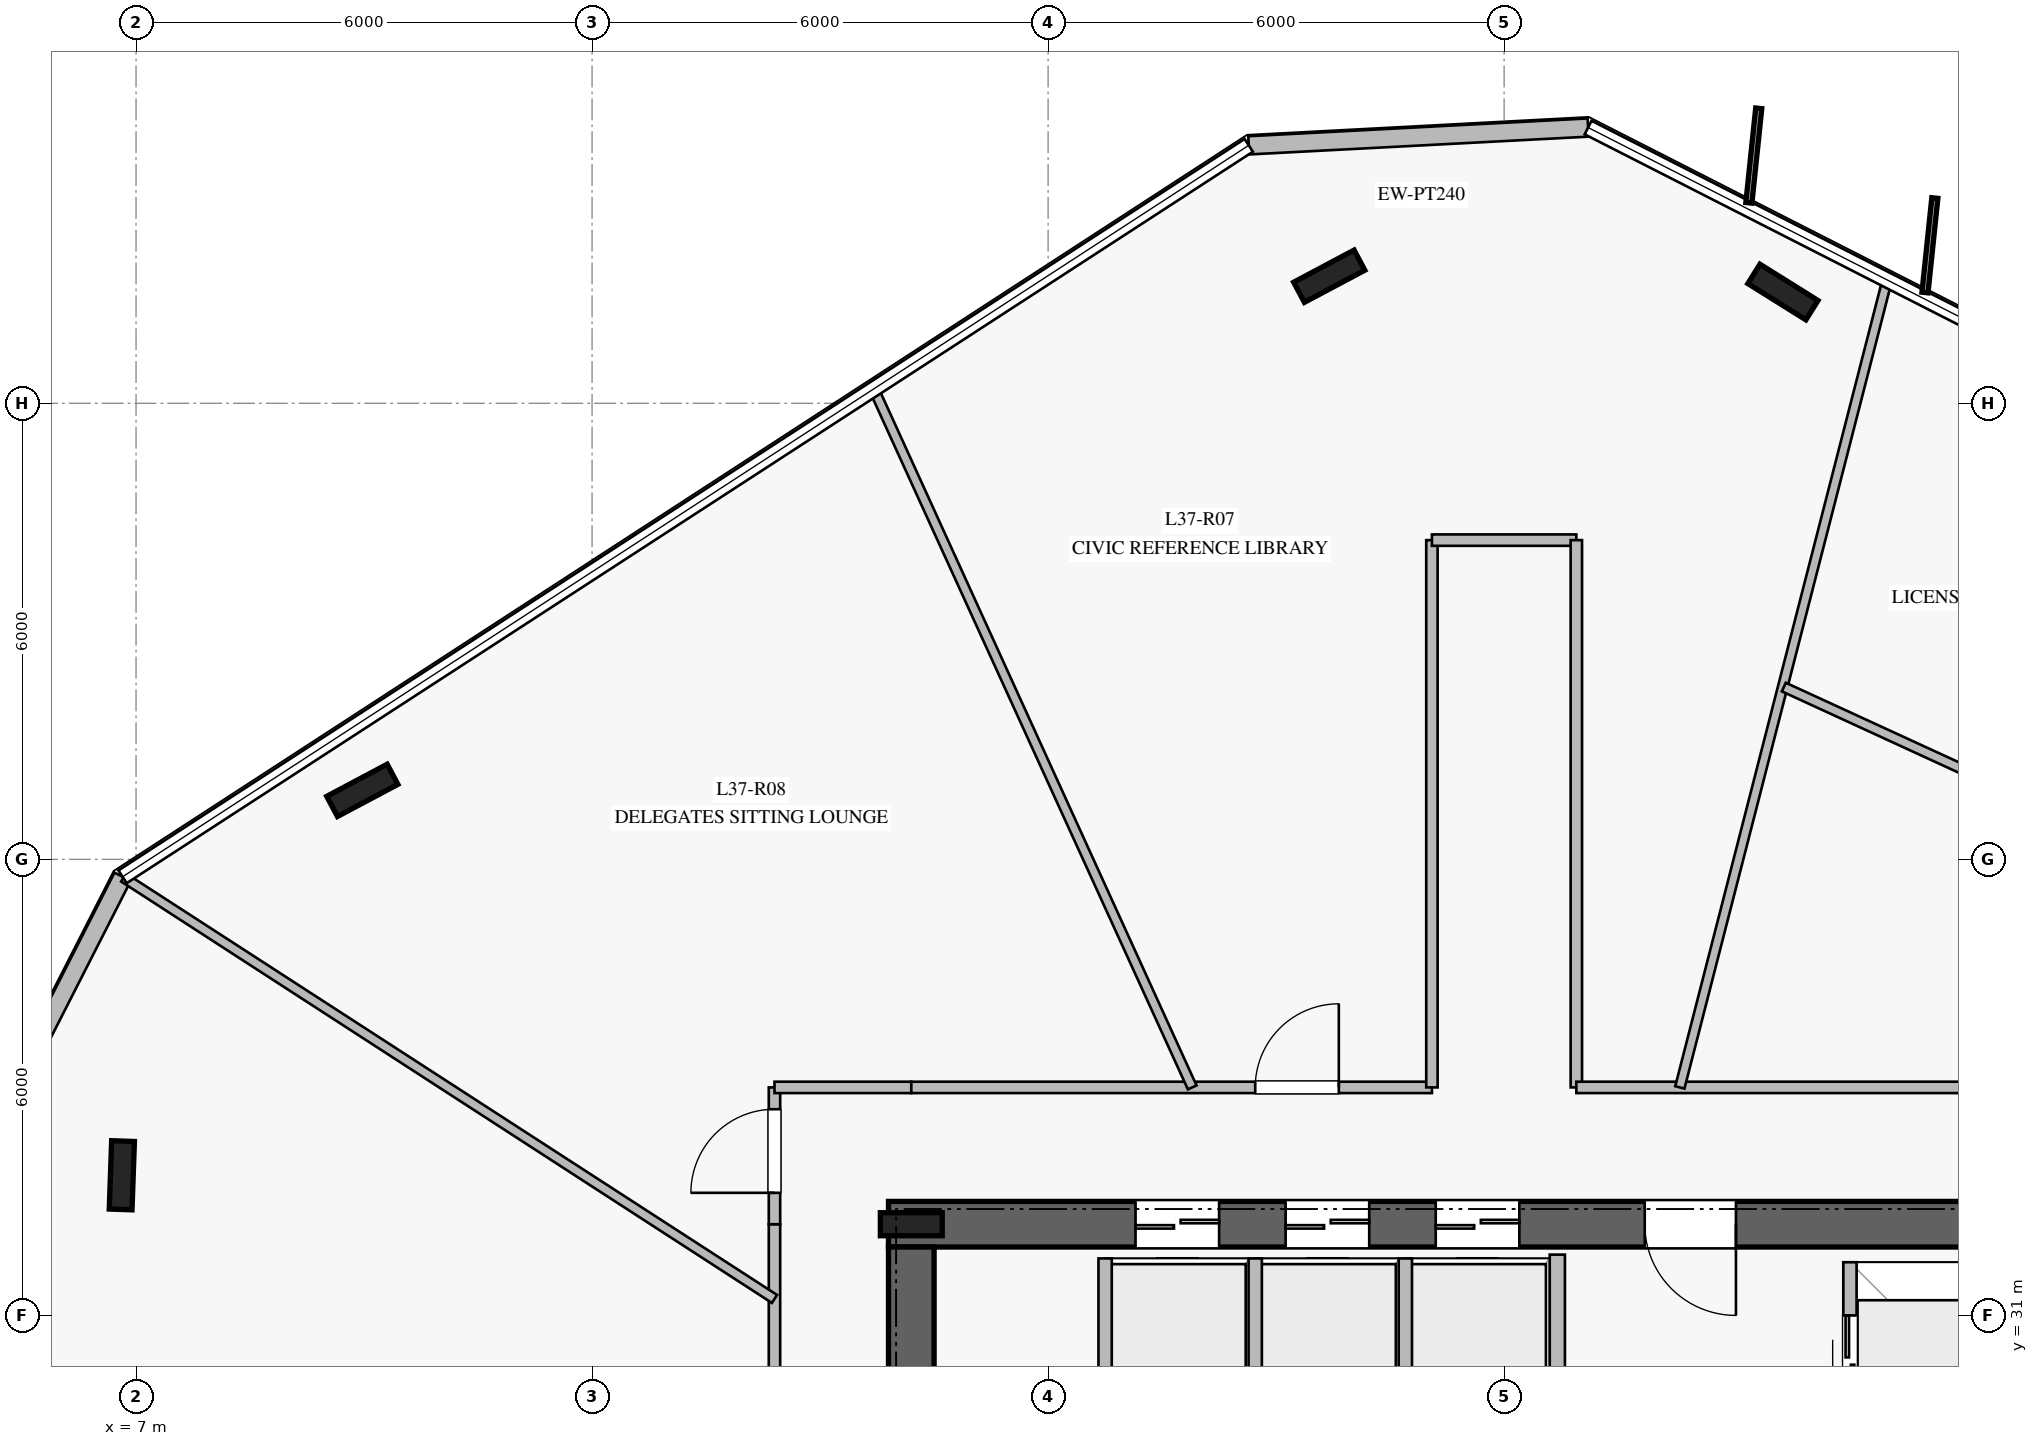
"""IFC4 building model, lengths in metres.
Left out: names, types, materials, properties, quantities, classifications, styles, units other than length and angle.
Written with IfcOpenShell. Run it as: python <this file> out.ifc"""

import sys

from ifc_helpers import new_model, si_unit, direction, frame, frame_2d, origin, origin_2d, place, context, subcontext, project, spatial, rectangle, i_section, extrude, element, fill, save


model = new_model("IFC4")
c1 = context("Model", 3, precision=1e-05, world=origin(), true_north=direction((0.0, 1.0)))
c2 = subcontext(c1, "Body", "Model", "MODEL_VIEW")
j1 = project(units=[si_unit("LENGTHUNIT", "METRE"), si_unit("PLANEANGLEUNIT", "RADIAN")], contexts=[c1])
p1 = place(None, origin())
s1 = spatial("IfcSite", under=j1, at=p1, CompositionType="ELEMENT")
p2 = place(p1, origin())
s2 = spatial("IfcBuilding", under=s1, at=p2, CompositionType="ELEMENT")
p3 = place(p2, frame((0.0, 0.0, 154.4)))
s3 = spatial("IfcBuildingStorey", under=s2, at=p3, CompositionType="ELEMENT", Elevation=154.4)
p4 = place(p3, frame((33.1, 32.2, 0.0), z_axis=(0.0, 0.0, 1.0), x_axis=(-1.0, 0.0, 0.0)))
e1 = element("IfcWall", 1, at=p4, inside=s3, PredefinedType="SHEAR", context=c2, shape_type="SweptSolid", body=[
    extrude(rectangle(XDim=16.2, YDim=0.6, at=frame_2d((8.1, 0.0))), origin(), (0.0, 0.0, 1.0), 3.76),
])
p5 = place(p4, frame((5.05, 0.0, 0.0)))
e2 = element("IfcOpeningElement", 2, at=p5, cuts=e1, PredefinedType="OPENING", context=c2, shape_type="SweptSolid", body=[
    extrude(rectangle(XDim=1.2, YDim=2.25, at=frame_2d((0.6, 1.125))), frame((0.0, 0.31, 0.0), z_axis=(0.0, -1.0, 0.0), x_axis=(1.0, 0.0, 0.0)), (0.0, 0.0, 1.0), 0.62),
])
p6 = place(p4, frame((11.85, 0.0, 0.0)))
e3 = element("IfcOpeningElement", 3, at=p6, cuts=e1, PredefinedType="OPENING", context=c2, shape_type="SweptSolid", body=[
    extrude(rectangle(XDim=1.1, YDim=2.2, at=frame_2d((0.55, 1.1))), frame((0.0, 0.31, 0.0), z_axis=(0.0, -1.0, 0.0), x_axis=(1.0, 0.0, 0.0)), (0.0, 0.0, 1.0), 0.62),
])
p7 = place(p4, frame((9.875, 0.0, 0.0)))
e4 = element("IfcOpeningElement", 4, at=p7, cuts=e1, PredefinedType="OPENING", context=c2, shape_type="SweptSolid", body=[
    extrude(rectangle(XDim=1.1, YDim=2.2, at=frame_2d((0.55, 1.1))), frame((0.0, 0.31, 0.0), z_axis=(0.0, -1.0, 0.0), x_axis=(1.0, 0.0, 0.0)), (0.0, 0.0, 1.0), 0.62),
])
p8 = place(p4, frame((7.9, 0.0, 0.0)))
e5 = element("IfcOpeningElement", 5, at=p8, cuts=e1, PredefinedType="OPENING", context=c2, shape_type="SweptSolid", body=[
    extrude(rectangle(XDim=1.1, YDim=2.2, at=frame_2d((0.55, 1.1))), frame((0.0, 0.31, 0.0), z_axis=(0.0, -1.0, 0.0), x_axis=(1.0, 0.0, 0.0)), (0.0, 0.0, 1.0), 0.62),
])
p9 = place(p3, frame((17.2, 31.9, 0.0), z_axis=(0.0, 0.0, 1.0), x_axis=(0.0, -1.0, 0.0)))
e6 = element("IfcWall", 6, at=p9, inside=s3, PredefinedType="SHEAR", context=c2, shape_type="SweptSolid", body=[
    extrude(rectangle(XDim=13.8, YDim=0.6, at=frame_2d((6.9, 0.0))), origin(), (0.0, 0.0, 1.0), 3.76),
])
p10 = place(p9, frame((2.05, 0.0, 0.0)))
e7 = element("IfcOpeningElement", 7, at=p10, cuts=e6, PredefinedType="OPENING", context=c2, shape_type="SweptSolid", body=[
    extrude(rectangle(XDim=1.5, YDim=2.2, at=frame_2d((0.75, 1.1))), frame((0.0, 0.31, 0.0), z_axis=(0.0, -1.0, 0.0), x_axis=(1.0, 0.0, 0.0)), (0.0, 0.0, 1.0), 0.62),
])
p11 = place(p3, frame((17.2, 32.2, 0.0), z_axis=(0.0, 0.0, 1.0), x_axis=(1.0, 0.0, 0.0)))
e8 = element("IfcColumn", 8, at=p11, inside=s3, PredefinedType="COLUMN", context=c2, shape_type="SweptSolid", body=[
    extrude(i_section(OverallWidth=0.303, OverallDepth=0.814, WebThickness=0.021, FlangeThickness=0.04, at=origin_2d()), origin(), (0.0, 0.0, 1.0), 4.0),
])
for number, where, z_axis, x_axis in (
    (9, (28.668, 44.464, 0.0), (0.0, 0.0, 1.0), (-0.848, 0.53, 0.0)),
    (10, (22.699, 44.672, 0.0), (0.0, 0.0, 1.0), (0.883, 0.469, 0.0)),
    (11, (9.977, 37.908, 0.0), (0.0, 0.0, 1.0), (0.883, 0.469, 0.0)),
    (12, (6.813, 32.844, 0.0), (0.0, 0.0, 1.0), (0.035, 0.999, 0.0)),
):
    element("IfcColumn", number, at=place(p3, frame(where, z_axis=z_axis, x_axis=x_axis)), inside=s3, PredefinedType="COLUMN", context=c2, shape_type="SweptSolid", body=[
        extrude(i_section(OverallWidth=0.3, OverallDepth=0.9, WebThickness=0.019, FlangeThickness=0.035, at=origin_2d()), origin(), (0.0, 0.0, 1.0), 4.0),
    ])
p12 = place(p3, frame((26.105, 46.628, 0.0), z_axis=(0.0, 0.0, 1.0), x_axis=(-0.998630920983, -0.052309498732, 0.0)))
e13 = element("IfcWall", 13, at=p12, inside=s3, PredefinedType="STANDARD", context=c2, shape_type="SweptSolid", body=[
    extrude(rectangle(XDim=4.471, YDim=0.24, at=frame_2d((2.236, 0.0))), origin(), (0.0, 0.0, 1.0), 3.76),
])
p13 = place(p3, frame((6.823, 36.771, 0.0), z_axis=(0.0, 0.0, 1.0), x_axis=(-0.454103301767, -0.89094903969, 0.0)))
e14 = element("IfcWall", 14, at=p13, inside=s3, PredefinedType="STANDARD", context=c2, shape_type="SweptSolid", body=[
    extrude(rectangle(XDim=4.47, YDim=0.24, at=frame_2d((2.235, 0.0))), origin(), (0.0, 0.0, 1.0), 3.76),
])
p14 = place(p3, frame((25.7, 26.65, 0.0), z_axis=(0.0, 0.0, 1.0), x_axis=(0.0, 1.0, 0.0)))
e15 = element("IfcWall", 15, at=p14, inside=s3, PredefinedType="PARTITIONING", context=c2, shape_type="SweptSolid", body=[
    extrude(rectangle(XDim=5.15, YDim=0.2, at=frame_2d((2.575, 0.0))), origin(), (0.0, 0.0, 1.0), 3.76),
])
for number, where, z_axis, x_axis in (
    (16, (19.75, 29.4, 0.0), (0.0, 0.0, 1.0), (0.0, 1.0, 0.0)),
    (17, (21.725, 29.4, 0.0), (0.0, 0.0, 1.0), (0.0, 1.0, 0.0)),
    (18, (23.7, 29.4, 0.0), (0.0, 0.0, 1.0), (0.0, 1.0, 0.0)),
):
    element("IfcWall", number, at=place(p3, frame(where, z_axis=z_axis, x_axis=x_axis)), inside=s3, PredefinedType="PARTITIONING", context=c2, shape_type="SweptSolid", body=[
        extrude(rectangle(XDim=2.35, YDim=0.175, at=frame_2d((1.175, 0.0))), origin(), (0.0, 0.0, 1.0), 3.76),
    ])
p15 = place(p3, frame((29.55, 29.1, 0.0), z_axis=(0.0, 0.0, 1.0), x_axis=(0.0, 1.0, 0.0)))
e19 = element("IfcWall", 19, at=p15, inside=s3, PredefinedType="PARTITIONING", context=c2, shape_type="SweptSolid", body=[
    extrude(rectangle(XDim=2.6, YDim=0.175, at=frame_2d((1.3, 0.0))), origin(), (0.0, 0.0, 1.0), 3.76),
])
p16 = place(p15, frame((0.7, 0.0, 0.0)))
e20 = element("IfcOpeningElement", 20, at=p16, cuts=e19, PredefinedType="OPENING", context=c2, shape_type="SweptSolid", body=[
    extrude(rectangle(XDim=1.2, YDim=2.2, at=frame_2d((0.6, 1.1))), frame((0.0, 0.098, 0.0), z_axis=(0.0, -1.0, 0.0), x_axis=(1.0, 0.0, 0.0)), (0.0, 0.0, 1.0), 0.195),
])
p17 = place(p3, frame((15.4, 25.95, 0.0), z_axis=(0.0, 0.0, 1.0), x_axis=(0.0, 1.0, 0.0)))
e21 = element("IfcWall", 21, at=p17, inside=s3, PredefinedType="PARTITIONING", context=c2, shape_type="SweptSolid", body=[
    extrude(rectangle(XDim=6.25, YDim=0.15, at=frame_2d((3.125, 0.0))), origin(), (0.0, 0.0, 1.0), 3.21),
])
p18 = place(p3, frame((15.4, 32.2, 0.0), z_axis=(0.0, 0.0, 1.0), x_axis=(0.0, 1.0, 0.0)))
e22 = element("IfcWall", 22, at=p18, inside=s3, PredefinedType="PARTITIONING", context=c2, shape_type="SweptSolid", body=[
    extrude(rectangle(XDim=1.8, YDim=0.15, at=frame_2d((0.9, 0.0))), origin(), (0.0, 0.0, 1.0), 3.21),
])
p19 = place(p18, frame((0.413, 0.0, 0.0)))
e23 = element("IfcOpeningElement", 23, at=p19, cuts=e22, PredefinedType="OPENING", context=c2, shape_type="SweptSolid", body=[
    extrude(rectangle(XDim=1.1, YDim=2.2, at=frame_2d((0.55, 1.1))), frame((0.0, 0.085, 0.0), z_axis=(0.0, -1.0, 0.0), x_axis=(1.0, 0.0, 0.0)), (0.0, 0.0, 1.0), 0.17),
])
p20 = place(p3, frame((15.4, 34.0, 0.0), z_axis=(0.0, 0.0, 1.0), x_axis=(1.0, 0.0, 0.0)))
e24 = element("IfcWall", 24, at=p20, inside=s3, PredefinedType="PARTITIONING", context=c2, shape_type="SweptSolid", body=[
    extrude(rectangle(XDim=1.8, YDim=0.15, at=frame_2d((0.9, 0.0))), origin(), (0.0, 0.0, 1.0), 3.76),
])
p21 = place(p3, frame((17.2, 34.0, 0.0), z_axis=(0.0, 0.0, 1.0), x_axis=(1.0, 0.0, 0.0)))
e25 = element("IfcWall", 25, at=p21, inside=s3, PredefinedType="PARTITIONING", context=c2, shape_type="SweptSolid", body=[
    extrude(rectangle(XDim=6.85, YDim=0.15, at=frame_2d((3.425, 0.0))), origin(), (0.0, 0.0, 1.0), 3.21),
])
p22 = place(p21, frame((4.525, 0.0, 0.0)))
e26 = element("IfcOpeningElement", 26, at=p22, cuts=e25, PredefinedType="OPENING", context=c2, shape_type="SweptSolid", body=[
    extrude(rectangle(XDim=1.1, YDim=2.2, at=frame_2d((0.55, 1.1))), frame((0.0, 0.085, 0.0), z_axis=(0.0, -1.0, 0.0), x_axis=(1.0, 0.0, 0.0)), (0.0, 0.0, 1.0), 0.17),
])
p23 = place(p3, frame((24.05, 34.0, 0.0), z_axis=(0.0, 0.0, 1.0), x_axis=(0.0, 1.0, 0.0)))
e27 = element("IfcWall", 27, at=p23, inside=s3, PredefinedType="PARTITIONING", context=c2, shape_type="SweptSolid", body=[
    extrude(rectangle(XDim=7.2, YDim=0.15, at=frame_2d((3.6, 0.0))), origin(), (0.0, 0.0, 1.0), 3.36),
])
p24 = place(p3, frame((24.05, 41.2, 0.0), z_axis=(0.0, 0.0, 1.0), x_axis=(1.0, 0.0, 0.0)))
e28 = element("IfcWall", 28, at=p24, inside=s3, PredefinedType="PARTITIONING", context=c2, shape_type="SweptSolid", body=[
    extrude(rectangle(XDim=1.9, YDim=0.15, at=frame_2d((0.95, 0.0))), origin(), (0.0, 0.0, 1.0), 3.76),
])
p25 = place(p3, frame((25.95, 41.2, 0.0), z_axis=(0.0, 0.0, 1.0), x_axis=(0.0, -1.0, 0.0)))
e29 = element("IfcWall", 29, at=p25, inside=s3, PredefinedType="PARTITIONING", context=c2, shape_type="SweptSolid", body=[
    extrude(rectangle(XDim=7.2, YDim=0.15, at=frame_2d((3.6, 0.0))), origin(), (0.0, 0.0, 1.0), 3.36),
])
p26 = place(p3, frame((25.95, 34.0, 0.0), z_axis=(0.0, 0.0, 1.0), x_axis=(1.0, 0.0, 0.0)))
e30 = element("IfcWall", 30, at=p26, inside=s3, PredefinedType="PARTITIONING", context=c2, shape_type="SweptSolid", body=[
    extrude(rectangle(XDim=15.25, YDim=0.15, at=frame_2d((7.625, 0.0))), origin(), (0.0, 0.0, 1.0), 3.21),
])
p27 = place(p26, frame((12.048, 0.0, 0.0)))
e31 = element("IfcOpeningElement", 31, at=p27, cuts=e30, PredefinedType="OPENING", context=c2, shape_type="SweptSolid", body=[
    extrude(rectangle(XDim=1.1, YDim=2.2, at=frame_2d((0.55, 1.1))), frame((0.0, 0.085, 0.0), z_axis=(0.0, -1.0, 0.0), x_axis=(1.0, 0.0, 0.0)), (0.0, 0.0, 1.0), 0.17),
])
p28 = place(p26, frame((5.305, 0.0, 0.0)))
e32 = element("IfcOpeningElement", 32, at=p28, cuts=e30, PredefinedType="OPENING", context=c2, shape_type="SweptSolid", body=[
    extrude(rectangle(XDim=1.1, YDim=2.2, at=frame_2d((0.55, 1.1))), frame((0.0, 0.085, 0.0), z_axis=(0.0, -1.0, 0.0), x_axis=(1.0, 0.0, 0.0)), (0.0, 0.0, 1.0), 0.17),
])
p29 = place(p3, frame((27.312, 34.0, 0.0), z_axis=(0.0, 0.0, 1.0), x_axis=(0.248752431695, 0.96856710027, 0.0)))
e33 = element("IfcWall", 33, at=p29, inside=s3, PredefinedType="PARTITIONING", context=c2, shape_type="SweptSolid", body=[
    extrude(rectangle(XDim=10.95, YDim=0.125, at=frame_2d((5.475, 0.0))), origin(), (0.0, 0.0, 1.0), 3.16),
])
p30 = place(p3, frame((20.896, 34.0, 0.0), z_axis=(0.0, 0.0, 1.0), x_axis=(-0.414877179532, 0.90987742356, 0.0)))
e34 = element("IfcWall", 34, at=p30, inside=s3, PredefinedType="PARTITIONING", context=c2, shape_type="SweptSolid", body=[
    extrude(rectangle(XDim=10.083, YDim=0.125, at=frame_2d((5.042, 0.0))), origin(), (0.0, 0.0, 1.0), 3.05),
])
p31 = place(p3, frame((15.4, 31.217, 0.0), z_axis=(0.0, 0.0, 1.0), x_axis=(-0.839399301713, 0.543515236478, 0.0)))
e35 = element("IfcWall", 35, at=p31, inside=s3, PredefinedType="PARTITIONING", context=c2, shape_type="SweptSolid", body=[
    extrude(rectangle(XDim=10.2, YDim=0.125, at=frame_2d((5.1, 0.0))), origin(), (0.0, 0.0, 1.0), 3.16),
])
p32 = place(p3, frame((37.577, 35.177, 0.0), z_axis=(0.0, 0.0, 1.0), x_axis=(-0.908588116284, 0.417693230671, 0.0)))
e36 = element("IfcWall", 36, at=p32, inside=s3, PredefinedType="PARTITIONING", context=c2, shape_type="SweptSolid", body=[
    extrude(rectangle(XDim=9.792, YDim=0.125, at=frame_2d((4.896, 0.0))), origin(), (0.0, 0.0, 1.0), 3.21),
])
p33 = place(p32, frame((4.396, 0.0, 0.0)))
e37 = element("IfcOpeningElement", 37, at=p33, cuts=e36, PredefinedType="OPENING", context=c2, shape_type="SweptSolid", body=[
    extrude(rectangle(XDim=1.0, YDim=2.15, at=frame_2d((0.5, 1.075))), frame((0.0, 0.073, 0.0), z_axis=(0.0, -1.0, 0.0), x_axis=(1.0, 0.0, 0.0)), (0.0, 0.0, 1.0), 0.145),
])
p34 = place(p5, origin())
e38 = element("IfcDoor", 38, at=p34, inside=s3, OperationType="SINGLE_SWING_LEFT", PredefinedType="DOOR", context=c2, shape_type="SweptSolid", body=[
    extrude(rectangle(XDim=1.2, YDim=2.25, at=frame_2d((0.6, 1.125))), frame((0.0, 0.025, 0.0), z_axis=(0.0, -1.0, 0.0), x_axis=(1.0, 0.0, 0.0)), (0.0, 0.0, 1.0), 0.05),
])
fill(e2, e38)
p35 = place(p6, origin())
e39 = element("IfcDoor", 39, at=p35, inside=s3, OperationType="DOUBLE_DOOR_SLIDING", PredefinedType="DOOR", context=c2, shape_type="SweptSolid", body=[
    extrude(rectangle(XDim=1.1, YDim=2.2, at=frame_2d((0.55, 1.1))), frame((0.0, 0.025, 0.0), z_axis=(0.0, -1.0, 0.0), x_axis=(1.0, 0.0, 0.0)), (0.0, 0.0, 1.0), 0.05),
])
fill(e3, e39)
p36 = place(p7, origin())
e40 = element("IfcDoor", 40, at=p36, inside=s3, OperationType="DOUBLE_DOOR_SLIDING", PredefinedType="DOOR", context=c2, shape_type="SweptSolid", body=[
    extrude(rectangle(XDim=1.1, YDim=2.2, at=frame_2d((0.55, 1.1))), frame((0.0, 0.025, 0.0), z_axis=(0.0, -1.0, 0.0), x_axis=(1.0, 0.0, 0.0)), (0.0, 0.0, 1.0), 0.05),
])
fill(e4, e40)
p37 = place(p8, origin())
e41 = element("IfcDoor", 41, at=p37, inside=s3, OperationType="DOUBLE_DOOR_SLIDING", PredefinedType="DOOR", context=c2, shape_type="SweptSolid", body=[
    extrude(rectangle(XDim=1.1, YDim=2.2, at=frame_2d((0.55, 1.1))), frame((0.0, 0.025, 0.0), z_axis=(0.0, -1.0, 0.0), x_axis=(1.0, 0.0, 0.0)), (0.0, 0.0, 1.0), 0.05),
])
fill(e5, e41)
p38 = place(p16, origin())
e42 = element("IfcDoor", 42, at=p38, inside=s3, OperationType="DOUBLE_DOOR_SLIDING", PredefinedType="DOOR", context=c2, shape_type="SweptSolid", body=[
    extrude(rectangle(XDim=1.2, YDim=2.2, at=frame_2d((0.6, 1.1))), frame((0.0, 0.025, 0.0), z_axis=(0.0, -1.0, 0.0), x_axis=(1.0, 0.0, 0.0)), (0.0, 0.0, 1.0), 0.05),
])
fill(e20, e42)
p39 = place(p22, origin())
e43 = element("IfcDoor", 43, at=p39, inside=s3, OperationType="SINGLE_SWING_RIGHT", PredefinedType="DOOR", context=c2, shape_type="SweptSolid", body=[
    extrude(rectangle(XDim=1.1, YDim=2.2, at=frame_2d((0.55, 1.1))), frame((0.0, 0.025, 0.0), z_axis=(0.0, -1.0, 0.0), x_axis=(1.0, 0.0, 0.0)), (0.0, 0.0, 1.0), 0.05),
])
fill(e26, e43)
p40 = place(p19, origin())
e44 = element("IfcDoor", 44, at=p40, inside=s3, OperationType="SINGLE_SWING_LEFT", PredefinedType="DOOR", context=c2, shape_type="SweptSolid", body=[
    extrude(rectangle(XDim=1.1, YDim=2.2, at=frame_2d((0.55, 1.1))), frame((0.0, 0.025, 0.0), z_axis=(0.0, -1.0, 0.0), x_axis=(1.0, 0.0, 0.0)), (0.0, 0.0, 1.0), 0.05),
])
fill(e23, e44)
save(model, sys.argv[1])
